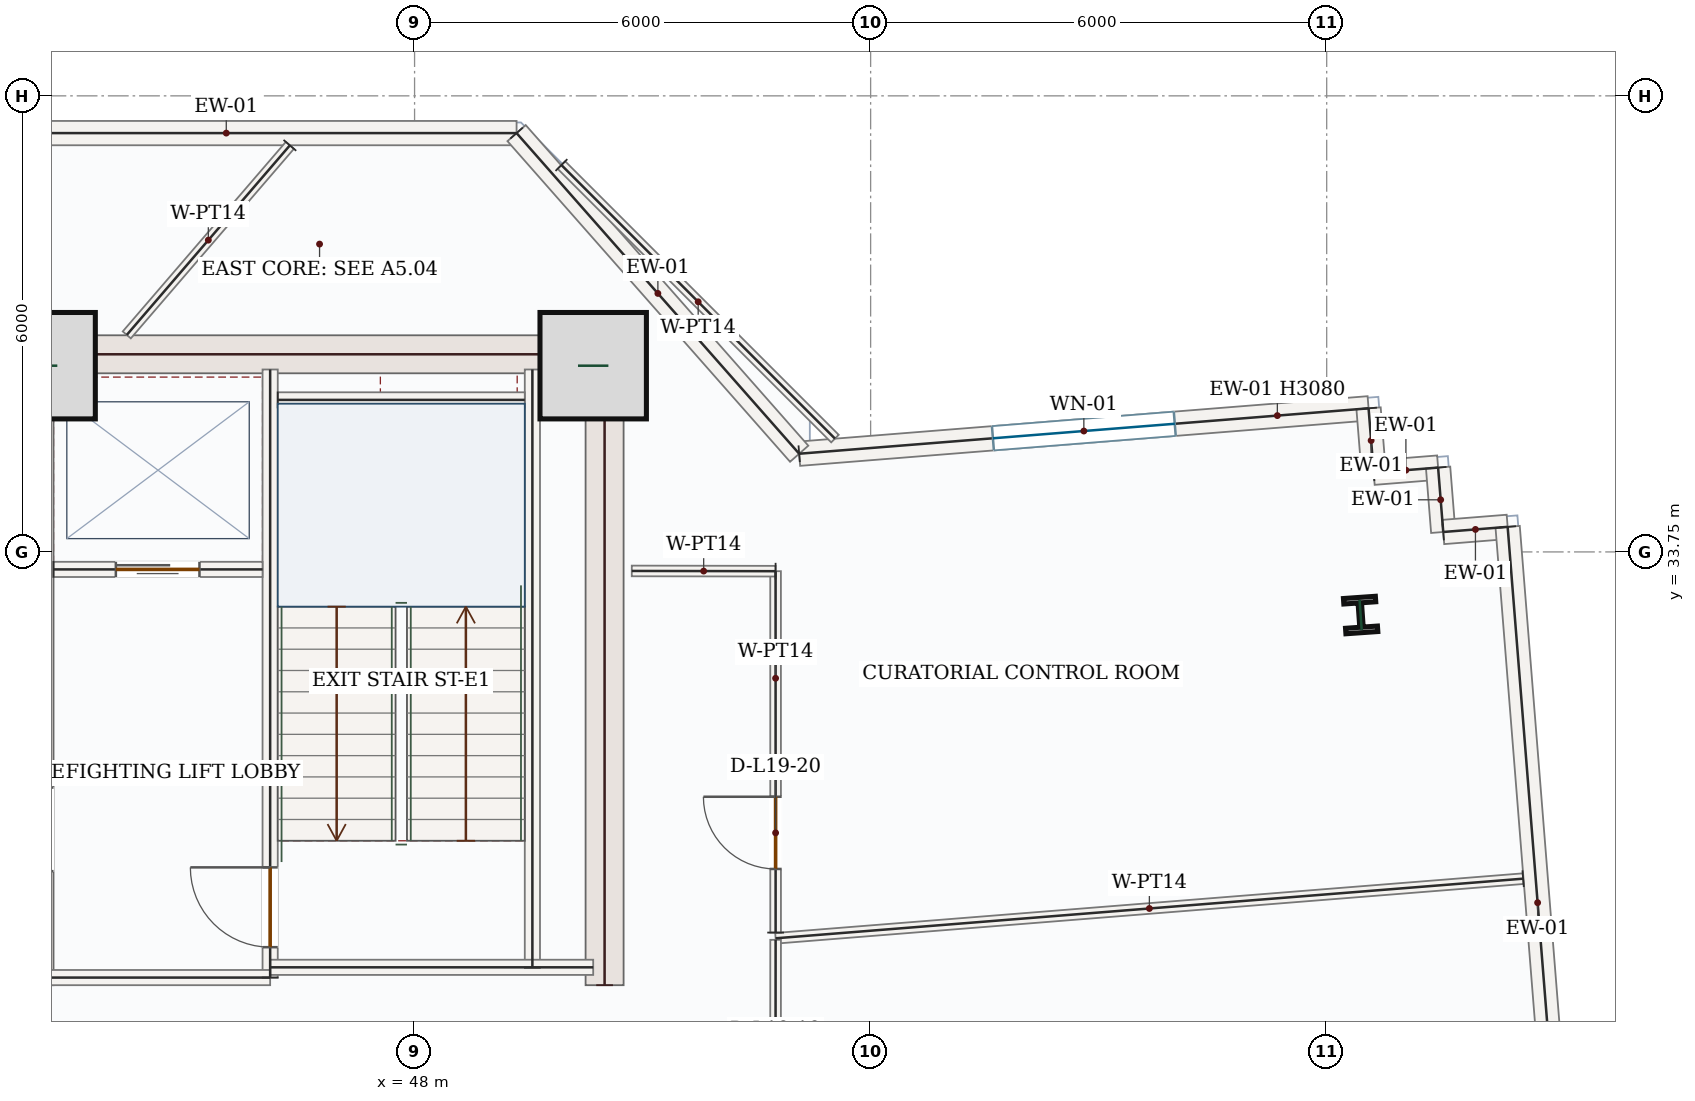
"""IFC4 building model, lengths in metres.
Left out: names, types, materials, properties, quantities, classifications, styles, units other than length and angle.
Written with IfcOpenShell. Run it as: python <this file> out.ifc"""

import sys

from ifc_helpers import new_model, si_unit, direction, frame, frame_2d, origin, origin_2d, place, context, subcontext, project, spatial, rectangle, i_section, extrude, source, transform, mapped, element, fill, save


model = new_model("IFC4")
c1 = context("Model", 3, precision=1e-05, world=origin(), true_north=direction((0.0, 1.0)))
c2 = subcontext(c1, "Body", "Model", "MODEL_VIEW")
j1 = project(units=[si_unit("LENGTHUNIT", "METRE"), si_unit("PLANEANGLEUNIT", "RADIAN")], contexts=[c1])
p1 = place(None, origin())
s1 = spatial("IfcSite", under=j1, at=p1, CompositionType="ELEMENT")
p2 = place(p1, origin())
s2 = spatial("IfcBuilding", under=s1, at=p2, CompositionType="ELEMENT")
p3 = place(p2, frame((0.0, 0.0, 87.9)))
s3 = spatial("IfcBuildingStorey", under=s2, at=p3, CompositionType="ELEMENT", Elevation=87.9)
p4 = place(p3, frame((43.0, 28.05, 0.0), z_axis=(0.0, 0.0, 1.0), x_axis=(0.0, 1.0, 0.0)))
e1 = element("IfcWall", 1, at=p4, inside=s3, PredefinedType="SHEAR", context=c2, shape_type="SweptSolid", body=[
    extrude(rectangle(XDim=8.55, YDim=0.5, at=frame_2d((4.275, 0.0))), origin(), (0.0, 0.0, 1.0), 3.95),
])
p5 = place(p4, frame((1.5, 0.0, 0.0)))
e2 = element("IfcOpeningElement", 2, at=p5, cuts=e1, PredefinedType="OPENING", context=c2, shape_type="SweptSolid", body=[
    extrude(rectangle(XDim=1.1, YDim=2.2, at=frame_2d((0.55, 1.1))), frame((0.0, 0.26, 0.0), z_axis=(0.0, -1.0, 0.0), x_axis=(1.0, 0.0, 0.0)), (0.0, 0.0, 1.0), 0.52),
])
m1 = source(origin(), c2, "Body", "SweptSolid", [
    extrude(rectangle(XDim=8.55, YDim=0.5, at=frame_2d((4.275, 0.0))), origin(), (0.0, 0.0, 1.0), 3.95),
])
p6 = place(p3, frame((50.5, 28.05, 0.0), z_axis=(0.0, 0.0, 1.0), x_axis=(0.0, 1.0, 0.0)))
e3 = element("IfcWall", 3, at=p6, inside=s3, PredefinedType="SHEAR", context=c2, shape_type="MappedRepresentation", body=[
    mapped(m1, transform((0.0, 0.0, 0.0), x_axis=(1.0, 0.0, 0.0), y_axis=(0.0, 1.0, 0.0), z_axis=(0.0, 0.0, 1.0), scale=1.0)),
])
m2 = source(origin(), c2, "Body", "SweptSolid", [
    extrude(rectangle(XDim=7.0, YDim=0.5, at=frame_2d((3.5, 0.0))), origin(), (0.0, 0.0, 1.0), 3.95),
])
p7 = place(p3, frame((43.25, 36.35, 0.0), z_axis=(0.0, 0.0, 1.0), x_axis=(1.0, 0.0, 0.0)))
e4 = element("IfcWall", 4, at=p7, inside=s3, PredefinedType="SHEAR", context=c2, shape_type="MappedRepresentation", body=[
    mapped(m2, transform((0.0, 0.0, 0.0), x_axis=(1.0, 0.0, 0.0), y_axis=(0.0, 1.0, 0.0), z_axis=(0.0, 0.0, 1.0), scale=1.0)),
])
m3 = source(origin(), c2, "Body", "SweptSolid", [
    extrude(rectangle(XDim=1.4, YDim=1.4, at=origin_2d()), origin(), (0.0, 0.0, 1.0), 4.2),
])
for number, where, z_axis, x_axis in (
    (5, (43.1, 36.2, 0.0), (0.0, 0.0, 1.0), (1.0, 0.0, 0.0)),
    (6, (50.35, 36.2, 0.0), (0.0, 0.0, 1.0), (1.0, 0.0, 0.0)),
):
    element("IfcColumn", number, at=place(p3, frame(where, z_axis=z_axis, x_axis=x_axis)), inside=s3, PredefinedType="COLUMN", context=c2, shape_type="MappedRepresentation", body=[
        mapped(m3, transform((0.0, 0.0, 0.0), x_axis=(1.0, 0.0, 0.0), y_axis=(0.0, 1.0, 0.0), z_axis=(0.0, 0.0, 1.0), scale=1.0)),
    ])
m4 = source(origin(), c2, "Body", "SweptSolid", [
    extrude(i_section(OverallWidth=0.421, OverallDepth=0.465, WebThickness=0.045, FlangeThickness=0.073, FilletRadius=0.018, at=origin_2d()), origin(), (0.0, 0.0, 1.0), 4.2),
])
p8 = place(p3, frame((60.447, 32.92, 0.0), z_axis=(0.0, 0.0, 1.0), x_axis=(0.99756405026, 0.069756473744, 0.0)))
e7 = element("IfcColumn", 7, at=p8, inside=s3, PredefinedType="COLUMN", context=c2, shape_type="MappedRepresentation", body=[
    mapped(m4, transform((0.0, 0.0, 0.0), x_axis=(1.0, 0.0, 0.0), y_axis=(0.0, 1.0, 0.0), z_axis=(0.0, 0.0, 1.0), scale=1.0)),
])
p9 = place(p3, frame((53.06, 35.042, 0.0), z_axis=(0.0, 0.0, 1.0), x_axis=(0.996834773193, 0.079501163223, 0.0)))
e8 = element("IfcWall", 8, at=p9, inside=s3, PredefinedType="SOLIDWALL", context=c2, shape_type="SweptSolid", body=[
    extrude(rectangle(XDim=7.514, YDim=0.32, at=frame_2d((3.757, 0.0))), origin(), (0.0, 0.0, 1.0), 3.08),
])
p10 = place(p9, frame((2.557, 0.0, 0.85)))
e9 = element("IfcOpeningElement", 9, at=p10, cuts=e8, PredefinedType="OPENING", context=c2, shape_type="SweptSolid", body=[
    extrude(rectangle(XDim=2.4, YDim=1.8, at=frame_2d((1.2, 0.9))), frame((0.0, 0.17, 0.0), z_axis=(0.0, -1.0, 0.0), x_axis=(1.0, 0.0, 0.0)), (0.0, 0.0, 1.0), 0.34),
])
m5 = source(origin(), c2, "Body", "SweptSolid", [
    extrude(rectangle(XDim=0.85, YDim=0.32, at=frame_2d((0.425, 0.0))), origin(), (0.0, 0.0, 1.0), 3.95),
])
p11 = place(p3, frame((60.551, 35.639, 0.0), z_axis=(0.0, 0.0, 1.0), x_axis=(0.079573954853, -0.996828965123, 0.0)))
e10 = element("IfcWall", 10, at=p11, inside=s3, PredefinedType="SOLIDWALL", context=c2, shape_type="MappedRepresentation", body=[
    mapped(m5, transform((0.0, 0.0, 0.0), x_axis=(1.0, 0.0, 0.0), y_axis=(0.0, 1.0, 0.0), z_axis=(0.0, 0.0, 1.0), scale=1.0)),
])
m6 = source(origin(), c2, "Body", "SweptSolid", [
    extrude(rectangle(XDim=0.85, YDim=0.32, at=frame_2d((0.425, 0.0))), origin(), (0.0, 0.0, 1.0), 3.95),
])
for number, where, z_axis, x_axis in (
    (11, (60.618, 34.792, 0.0), (0.0, 0.0, 1.0), (0.997, 0.08, 0.0)),
    (12, (61.466, 34.86, 0.0), (0.0, 0.0, 1.0), (0.08, -0.997, 0.0)),
):
    element("IfcWall", number, at=place(p3, frame(where, z_axis=z_axis, x_axis=x_axis)), inside=s3, PredefinedType="SOLIDWALL", context=c2, shape_type="MappedRepresentation", body=[
        mapped(m6, transform((0.0, 0.0, 0.0), x_axis=(1.0, 0.0, 0.0), y_axis=(0.0, 1.0, 0.0), z_axis=(0.0, 0.0, 1.0), scale=1.0)),
    ])
p12 = place(p3, frame((61.533, 34.012, 0.0), z_axis=(0.0, 0.0, 1.0), x_axis=(0.996851711541, 0.079288493483, 0.0)))
e13 = element("IfcWall", 13, at=p12, inside=s3, PredefinedType="SOLIDWALL", context=c2, shape_type="MappedRepresentation", body=[
    mapped(m5, transform((0.0, 0.0, 0.0), x_axis=(1.0, 0.0, 0.0), y_axis=(0.0, 1.0, 0.0), z_axis=(0.0, 0.0, 1.0), scale=1.0)),
])
m7 = source(origin(), c2, "Body", "SweptSolid", [
    extrude(rectangle(XDim=9.92, YDim=0.32, at=frame_2d((4.96, 0.0))), origin(), (0.0, 0.0, 1.0), 3.95),
])
p13 = place(p3, frame((62.381, 34.08, 0.0), z_axis=(0.0, 0.0, 1.0), x_axis=(0.07949480177, -0.996835280521, 0.0)))
e14 = element("IfcWall", 14, at=p13, inside=s3, PredefinedType="SOLIDWALL", context=c2, shape_type="MappedRepresentation", body=[
    mapped(m7, transform((0.0, 0.0, 0.0), x_axis=(1.0, 0.0, 0.0), y_axis=(0.0, 1.0, 0.0), z_axis=(0.0, 0.0, 1.0), scale=1.0)),
])
m8 = source(origin(), c2, "Body", "SweptSolid", [
    extrude(rectangle(XDim=7.639, YDim=0.32, at=frame_2d((3.819, 0.0))), origin(), (0.0, 0.0, 1.0), 3.95),
])
p14 = place(p3, frame((41.703, 39.26, 0.0), z_axis=(0.0, 0.0, 1.0), x_axis=(1.0, 0.0, 0.0)))
e15 = element("IfcWall", 15, at=p14, inside=s3, PredefinedType="SOLIDWALL", context=c2, shape_type="MappedRepresentation", body=[
    mapped(m8, transform((0.0, 0.0, 0.0), x_axis=(1.0, 0.0, 0.0), y_axis=(0.0, 1.0, 0.0), z_axis=(0.0, 0.0, 1.0), scale=1.0)),
])
m9 = source(origin(), c2, "Body", "SweptSolid", [
    extrude(rectangle(XDim=5.623, YDim=0.32, at=frame_2d((2.812, 0.0))), origin(), (0.0, 0.0, 1.0), 3.95),
])
p15 = place(p3, frame((49.342, 39.26, 0.0), z_axis=(0.0, 0.0, 1.0), x_axis=(0.66122376427, -0.750188731963, 0.0)))
e16 = element("IfcWall", 16, at=p15, inside=s3, PredefinedType="SOLIDWALL", context=c2, shape_type="MappedRepresentation", body=[
    mapped(m9, transform((0.0, 0.0, 0.0), x_axis=(1.0, 0.0, 0.0), y_axis=(0.0, 1.0, 0.0), z_axis=(0.0, 0.0, 1.0), scale=1.0)),
])
m10 = source(origin(), c2, "Body", "SweptSolid", [
    extrude(rectangle(XDim=7.87, YDim=0.2, at=frame_2d((3.935, 0.0))), origin(), (0.0, 0.0, 1.0), 3.95),
])
p16 = place(p3, frame((49.55, 28.28, 0.0), z_axis=(0.0, 0.0, 1.0), x_axis=(0.0, 1.0, 0.0)))
e17 = element("IfcWall", 17, at=p16, inside=s3, PredefinedType="SOLIDWALL", context=c2, shape_type="MappedRepresentation", body=[
    mapped(m10, transform((0.0, 0.0, 0.0), x_axis=(1.0, 0.0, 0.0), y_axis=(0.0, 1.0, 0.0), z_axis=(0.0, 0.0, 1.0), scale=1.0)),
])
p17 = place(p3, frame((46.1, 28.15, 0.0), z_axis=(0.0, 0.0, 1.0), x_axis=(0.0, 1.0, 0.0)))
e18 = element("IfcWall", 18, at=p17, inside=s3, PredefinedType="SOLIDWALL", context=c2, shape_type="SweptSolid", body=[
    extrude(rectangle(XDim=8.0, YDim=0.2, at=frame_2d((4.0, 0.0))), origin(), (0.0, 0.0, 1.0), 3.95),
])
p18 = place(p17, frame((0.4, 0.0, 0.0)))
e19 = element("IfcOpeningElement", 19, at=p18, cuts=e18, PredefinedType="OPENING", context=c2, shape_type="SweptSolid", body=[
    extrude(rectangle(XDim=1.05, YDim=2.15, at=frame_2d((0.525, 1.075))), frame((0.0, 0.11, 0.0), z_axis=(0.0, -1.0, 0.0), x_axis=(1.0, 0.0, 0.0)), (0.0, 0.0, 1.0), 0.22),
])
m11 = source(origin(), c2, "Body", "SweptSolid", [
    extrude(rectangle(XDim=3.0, YDim=0.2, at=frame_2d((1.5, 0.0))), origin(), (0.0, 0.0, 1.0), 3.95),
])
p19 = place(p3, frame((43.1, 28.15, 0.0), z_axis=(0.0, 0.0, 1.0), x_axis=(1.0, 0.0, 0.0)))
e20 = element("IfcWall", 20, at=p19, inside=s3, PredefinedType="SOLIDWALL", context=c2, shape_type="MappedRepresentation", body=[
    mapped(m11, transform((0.0, 0.0, 0.0), x_axis=(1.0, 0.0, 0.0), y_axis=(0.0, 1.0, 0.0), z_axis=(0.0, 0.0, 1.0), scale=1.0)),
])
m12 = source(origin(), c2, "Body", "SweptSolid", [
    extrude(rectangle(XDim=4.25, YDim=0.2, at=frame_2d((2.125, 0.0))), origin(), (0.0, 0.0, 1.0), 3.95),
])
p20 = place(p3, frame((46.1, 28.285, 0.0), z_axis=(0.0, 0.0, 1.0), x_axis=(1.0, 0.0, 0.0)))
e21 = element("IfcWall", 21, at=p20, inside=s3, PredefinedType="SOLIDWALL", context=c2, shape_type="MappedRepresentation", body=[
    mapped(m12, transform((0.0, 0.0, 0.0), x_axis=(1.0, 0.0, 0.0), y_axis=(0.0, 1.0, 0.0), z_axis=(0.0, 0.0, 1.0), scale=1.0)),
])
m13 = source(origin(), c2, "Body", "SweptSolid", [
    extrude(rectangle(XDim=3.25, YDim=0.2, at=frame_2d((1.625, 0.0))), origin(), (0.0, 0.0, 1.0), 3.95),
])
p21 = place(p3, frame((46.2, 35.75, 0.0), z_axis=(0.0, 0.0, 1.0), x_axis=(1.0, 0.0, 0.0)))
e22 = element("IfcWall", 22, at=p21, inside=s3, PredefinedType="SOLIDWALL", context=c2, shape_type="MappedRepresentation", body=[
    mapped(m13, transform((0.0, 0.0, 0.0), x_axis=(1.0, 0.0, 0.0), y_axis=(0.0, 1.0, 0.0), z_axis=(0.0, 0.0, 1.0), scale=1.0)),
])
p22 = place(p3, frame((43.25, 33.52, 0.0), z_axis=(0.0, 0.0, 1.0), x_axis=(1.0, 0.0, 0.0)))
e23 = element("IfcWall", 23, at=p22, inside=s3, PredefinedType="SOLIDWALL", context=c2, shape_type="SweptSolid", body=[
    extrude(rectangle(XDim=2.75, YDim=0.2, at=frame_2d((1.375, 0.0))), origin(), (0.0, 0.0, 1.0), 3.95),
])
p23 = place(p22, frame((0.82, 0.0, 0.0)))
e24 = element("IfcOpeningElement", 24, at=p23, cuts=e23, PredefinedType="OPENING", context=c2, shape_type="SweptSolid", body=[
    extrude(rectangle(XDim=1.1, YDim=2.15, at=frame_2d((0.55, 1.075))), frame((0.0, 0.11, 0.0), z_axis=(0.0, -1.0, 0.0), x_axis=(1.0, 0.0, 0.0)), (0.0, 0.0, 1.0), 0.22),
])
m14 = source(origin(), c2, "Body", "SweptSolid", [
    extrude(rectangle(XDim=3.29, YDim=0.14, at=frame_2d((1.645, 0.0))), origin(), (0.0, 0.0, 1.0), 3.95),
])
p24 = place(p3, frame((46.36, 39.099, 0.0), z_axis=(0.0, 0.0, 1.0), x_axis=(-0.652214149627, -0.758034763732, 0.0)))
e25 = element("IfcWall", 25, at=p24, inside=s3, PredefinedType="PARTITIONING", context=c2, shape_type="MappedRepresentation", body=[
    mapped(m14, transform((0.0, 0.0, 0.0), x_axis=(1.0, 0.0, 0.0), y_axis=(0.0, 1.0, 0.0), z_axis=(0.0, 0.0, 1.0), scale=1.0)),
])
m15 = source(origin(), c2, "Body", "SweptSolid", [
    extrude(rectangle(XDim=5.09, YDim=0.14, at=frame_2d((2.545, 0.0))), origin(), (0.0, 0.0, 1.0), 3.95),
])
p25 = place(p3, frame((49.932, 38.84, 0.0), z_axis=(0.0, 0.0, 1.0), x_axis=(0.707106781187, -0.707106781187, 0.0)))
e26 = element("IfcWall", 26, at=p25, inside=s3, PredefinedType="PARTITIONING", context=c2, shape_type="MappedRepresentation", body=[
    mapped(m15, transform((0.0, 0.0, 0.0), x_axis=(1.0, 0.0, 0.0), y_axis=(0.0, 1.0, 0.0), z_axis=(0.0, 0.0, 1.0), scale=1.0)),
])
m16 = source(origin(), c2, "Body", "SweptSolid", [
    extrude(rectangle(XDim=9.865, YDim=0.14, at=frame_2d((4.933, 0.0))), origin(), (0.0, 0.0, 1.0), 3.95),
])
p26 = place(p3, frame((62.584, 29.451, 0.0), z_axis=(0.0, 0.0, 1.0), x_axis=(-0.996833900052, -0.079512110446, 0.0)))
e27 = element("IfcWall", 27, at=p26, inside=s3, PredefinedType="PARTITIONING", context=c2, shape_type="MappedRepresentation", body=[
    mapped(m16, transform((0.0, 0.0, 0.0), x_axis=(1.0, 0.0, 0.0), y_axis=(0.0, 1.0, 0.0), z_axis=(0.0, 0.0, 1.0), scale=1.0)),
])
p27 = place(p3, frame((52.75, 28.742, 0.0), z_axis=(0.0, 0.0, 1.0), x_axis=(-0.000102701037, 0.999999994726, 0.0)))
e28 = element("IfcWall", 28, at=p27, inside=s3, PredefinedType="PARTITIONING", context=c2, shape_type="SweptSolid", body=[
    extrude(rectangle(XDim=4.754, YDim=0.14, at=frame_2d((2.377, 0.0))), origin(), (0.0, 0.0, 1.0), 3.95),
])
p28 = place(p27, frame((0.837, 0.0, 0.0)))
e29 = element("IfcOpeningElement", 29, at=p28, cuts=e28, PredefinedType="OPENING", context=c2, shape_type="SweptSolid", body=[
    extrude(rectangle(XDim=0.95, YDim=2.15, at=frame_2d((0.475, 1.075))), frame((0.0, 0.08, 0.0), z_axis=(0.0, -1.0, 0.0), x_axis=(1.0, 0.0, 0.0)), (0.0, 0.0, 1.0), 0.16),
])
m17 = source(origin(), c2, "Body", "SweptSolid", [
    extrude(rectangle(XDim=1.892, YDim=0.14, at=frame_2d((0.946, 0.0))), origin(), (0.0, 0.0, 1.0), 3.95),
])
p29 = place(p3, frame((52.75, 33.497, 0.0), z_axis=(0.0, 0.0, 1.0), x_axis=(-0.999998592772, 0.001677633463, 0.0)))
e30 = element("IfcWall", 30, at=p29, inside=s3, PredefinedType="PARTITIONING", context=c2, shape_type="MappedRepresentation", body=[
    mapped(m17, transform((0.0, 0.0, 0.0), x_axis=(1.0, 0.0, 0.0), y_axis=(0.0, 1.0, 0.0), z_axis=(0.0, 0.0, 1.0), scale=1.0)),
])
p30 = place(p3, frame((52.745, 20.576, 0.0), z_axis=(0.0, 0.0, 1.0), x_axis=(0.000604997167, 0.999999816989, 0.0)))
e31 = element("IfcWall", 31, at=p30, inside=s3, PredefinedType="PARTITIONING", context=c2, shape_type="SweptSolid", body=[
    extrude(rectangle(XDim=8.071, YDim=0.14, at=frame_2d((4.035, 0.0))), origin(), (0.0, 0.0, 1.0), 3.95),
])
p31 = place(p30, frame((5.554, 0.0, 0.0)))
e32 = element("IfcOpeningElement", 32, at=p31, cuts=e31, PredefinedType="OPENING", context=c2, shape_type="SweptSolid", body=[
    extrude(rectangle(XDim=0.95, YDim=2.15, at=frame_2d((0.475, 1.075))), frame((0.0, 0.08, 0.0), z_axis=(0.0, -1.0, 0.0), x_axis=(1.0, 0.0, 0.0)), (0.0, 0.0, 1.0), 0.16),
])
m18 = source(origin(), c2, "Body", "SweptSolid", [
    extrude(rectangle(XDim=2.4, YDim=1.8, at=frame_2d((1.2, 0.9))), frame((0.0, 0.03, 0.0), z_axis=(0.0, -1.0, 0.0), x_axis=(1.0, 0.0, 0.0)), (0.0, 0.0, 1.0), 0.06),
])
p32 = place(p10, origin())
e33 = element("IfcWindow", 33, at=p32, inside=s3, PartitioningType="DOUBLE_PANEL_VERTICAL", PredefinedType="WINDOW", context=c2, shape_type="MappedRepresentation", body=[
    mapped(m18, transform((0.0, 0.0, 0.0), x_axis=(1.0, 0.0, 0.0), y_axis=(0.0, 1.0, 0.0), z_axis=(0.0, 0.0, 1.0), scale=1.0)),
])
fill(e9, e33)
m19 = source(origin(), c2, "Body", "SweptSolid", [
    extrude(rectangle(XDim=1.05, YDim=2.15, at=frame_2d((0.525, 1.075))), frame((0.0, 0.025, 0.0), z_axis=(0.0, -1.0, 0.0), x_axis=(1.0, 0.0, 0.0)), (0.0, 0.0, 1.0), 0.05),
])
p33 = place(p18, origin())
e34 = element("IfcDoor", 34, at=p33, inside=s3, OperationType="SINGLE_SWING_RIGHT", PredefinedType="DOOR", context=c2, shape_type="MappedRepresentation", body=[
    mapped(m19, transform((0.0, 0.0, 0.0), x_axis=(1.0, 0.0, 0.0), y_axis=(0.0, 1.0, 0.0), z_axis=(0.0, 0.0, 1.0), scale=1.0)),
])
fill(e19, e34)
m20 = source(origin(), c2, "Body", "SweptSolid", [
    extrude(rectangle(XDim=1.1, YDim=2.15, at=frame_2d((0.55, 1.075))), frame((0.0, 0.025, 0.0), z_axis=(0.0, -1.0, 0.0), x_axis=(1.0, 0.0, 0.0)), (0.0, 0.0, 1.0), 0.05),
])
p34 = place(p23, origin())
e35 = element("IfcDoor", 35, at=p34, inside=s3, OperationType="DOUBLE_DOOR_SLIDING", PredefinedType="DOOR", context=c2, shape_type="MappedRepresentation", body=[
    mapped(m20, transform((0.0, 0.0, 0.0), x_axis=(1.0, 0.0, 0.0), y_axis=(0.0, 1.0, 0.0), z_axis=(0.0, 0.0, 1.0), scale=1.0)),
])
fill(e24, e35)
m21 = source(origin(), c2, "Body", "SweptSolid", [
    extrude(rectangle(XDim=0.95, YDim=2.15, at=frame_2d((0.475, 1.075))), frame((0.0, 0.025, 0.0), z_axis=(0.0, -1.0, 0.0), x_axis=(1.0, 0.0, 0.0)), (0.0, 0.0, 1.0), 0.05),
])
p35 = place(p28, origin())
e36 = element("IfcDoor", 36, at=p35, inside=s3, OperationType="SINGLE_SWING_RIGHT", PredefinedType="DOOR", context=c2, shape_type="MappedRepresentation", body=[
    mapped(m21, transform((0.0, 0.0, 0.0), x_axis=(1.0, 0.0, 0.0), y_axis=(0.0, 1.0, 0.0), z_axis=(0.0, 0.0, 1.0), scale=1.0)),
])
fill(e29, e36)
save(model, sys.argv[1])
